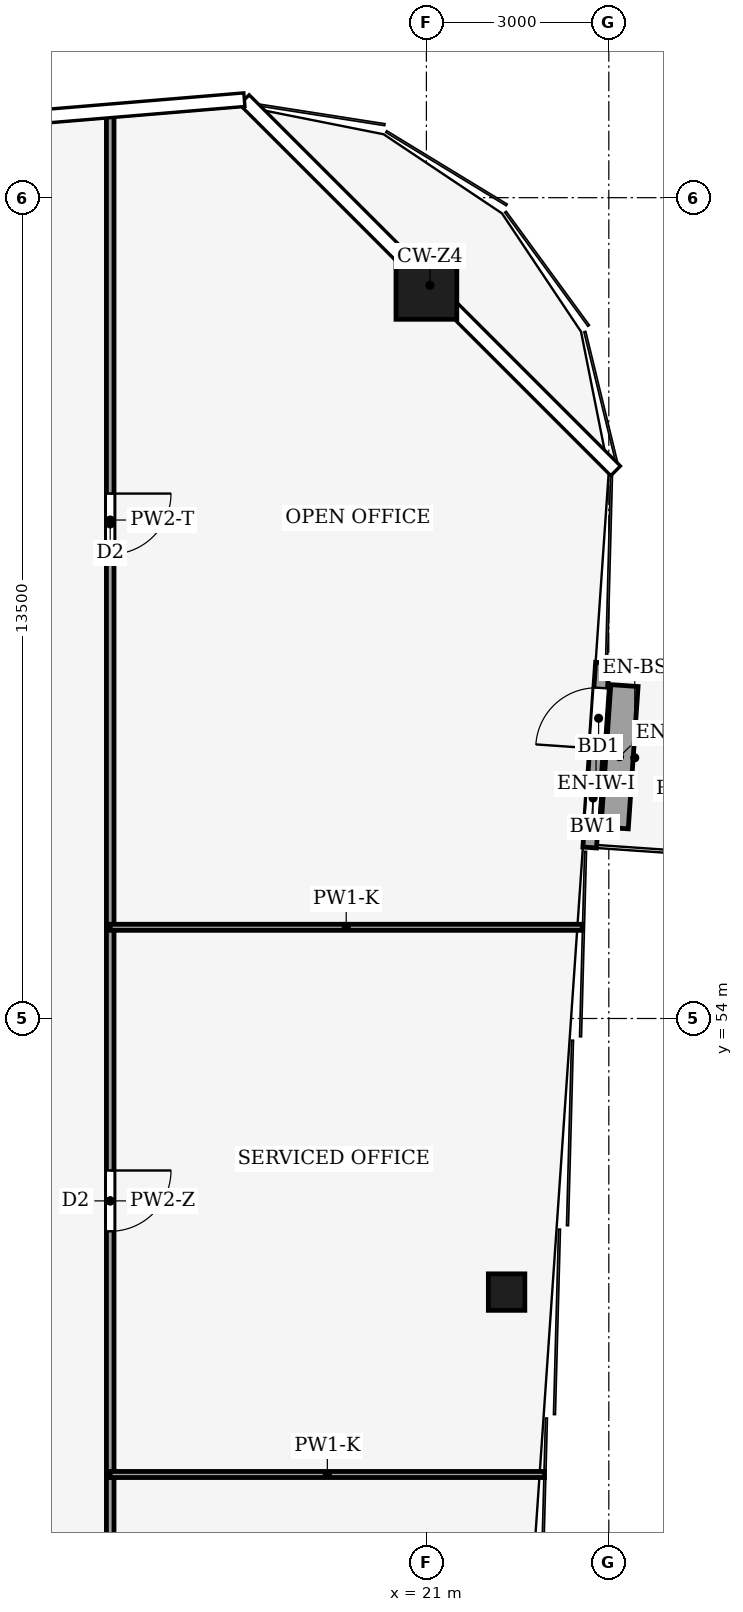
"""IFC4 building model, lengths in metres.
Left out: names, types, materials, properties, quantities, classifications, styles, units other than length and angle.
Written with IfcOpenShell. Run it as: python <this file> out.ifc"""

import sys

from ifc_helpers import new_model, si_unit, direction, frame, frame_2d, origin, origin_2d, place, context, subcontext, project, spatial, rectangle, hollow_rectangle, extrude, element, fill, save


model = new_model("IFC4")
c1 = context("Model", 3, precision=1e-05, world=origin(), true_north=direction((0.0, 1.0)))
c2 = subcontext(c1, "Body", "Model", "MODEL_VIEW")
j1 = project(units=[si_unit("LENGTHUNIT", "METRE"), si_unit("PLANEANGLEUNIT", "RADIAN")], contexts=[c1])
p1 = place(None, origin())
s1 = spatial("IfcSite", under=j1, at=p1, CompositionType="ELEMENT")
p2 = place(p1, origin())
s2 = spatial("IfcBuilding", under=s1, at=p2, CompositionType="ELEMENT")
p3 = place(p2, frame((0.0, 0.0, 278.0)))
s3 = spatial("IfcBuildingStorey", under=s2, at=p3, CompositionType="ELEMENT", Elevation=278.0)
p4 = place(p3, frame((21.0, 66.0, 0.0), z_axis=(0.0, 0.0, 1.0), x_axis=(1.0, 0.0, 0.0)))
e1 = element("IfcColumn", 1, at=p4, inside=s3, PredefinedType="COLUMN", context=c2, shape_type="SweptSolid", body=[
    extrude(hollow_rectangle(XDim=1.0, YDim=1.0, WallThickness=0.045, at=origin_2d()), origin(), (0.0, 0.0, 1.0), 4.0),
])
p5 = place(p3, frame((22.319, 49.5, 0.0), z_axis=(0.0, 0.0, 1.0), x_axis=(1.0, 0.0, 0.0)))
e2 = element("IfcColumn", 2, at=p5, inside=s3, PredefinedType="COLUMN", context=c2, shape_type="SweptSolid", body=[
    extrude(hollow_rectangle(XDim=0.6, YDim=0.6, WallThickness=0.025, at=origin_2d()), origin(), (0.0, 0.0, 1.0), 4.0),
])
p6 = place(p3, frame((23.686, 56.812, 0.0), z_axis=(0.0, 0.0, 1.0), x_axis=(0.06875808698, 0.99763336225, 0.0)))
e3 = element("IfcWall", 3, at=p6, inside=s3, PredefinedType="SOLIDWALL", context=c2, shape_type="SweptSolid", body=[
    extrude(rectangle(XDim=3.047, YDim=0.224, at=frame_2d((1.523, 0.0))), origin(), (0.0, 0.0, 1.0), 3.65),
])
p7 = place(p6, frame((1.631, 0.0, 0.0)))
e4 = element("IfcOpeningElement", 4, at=p7, cuts=e3, PredefinedType="OPENING", context=c2, shape_type="SweptSolid", body=[
    extrude(rectangle(XDim=1.0, YDim=2.1, at=frame_2d((0.5, 1.05))), frame((0.0, 0.122, 0.0), z_axis=(0.0, -1.0, 0.0), x_axis=(1.0, 0.0, 0.0)), (0.0, 0.0, 1.0), 0.244),
])
p8 = place(p6, frame((0.416, 0.0, 0.9)))
e5 = element("IfcOpeningElement", 5, at=p8, cuts=e3, PredefinedType="OPENING", context=c2, shape_type="SweptSolid", body=[
    extrude(rectangle(XDim=0.8, YDim=1.2, at=frame_2d((0.4, 0.6))), frame((0.0, 0.122, 0.0), z_axis=(0.0, -1.0, 0.0), x_axis=(1.0, 0.0, 0.0)), (0.0, 0.0, 1.0), 0.244),
])
p9 = place(p3, frame((24.096, 57.135, 0.0), z_axis=(0.0, 0.0, 1.0), x_axis=(0.06877709495, 0.997632052016, 0.0)))
e6 = element("IfcWall", 6, at=p9, inside=s3, PredefinedType="USERDEFINED", context=c2, shape_type="SweptSolid", body=[
    extrude(rectangle(XDim=2.346, YDim=0.45, at=frame_2d((1.173, 0.0))), origin(), (0.0, 0.0, 1.0), 0.4),
])
p10 = place(p3, frame((15.8, 46.5, 0.0), z_axis=(0.0, 0.0, 1.0), x_axis=(0.0, -1.0, 0.0)))
e7 = element("IfcWall", 7, at=p10, inside=s3, PredefinedType="PARTITIONING", context=c2, shape_type="SweptSolid", body=[
    extrude(rectangle(XDim=12.0, YDim=0.125, at=frame_2d((6.0, 0.0))), origin(), (0.0, 0.0, 1.0), 3.02),
])
p11 = place(p10, frame((5.5, 0.0, 0.0)))
e8 = element("IfcOpeningElement", 8, at=p11, cuts=e7, PredefinedType="OPENING", context=c2, shape_type="SweptSolid", body=[
    extrude(rectangle(XDim=1.0, YDim=2.1, at=frame_2d((0.5, 1.05))), frame((0.0, 0.073, 0.0), z_axis=(0.0, -1.0, 0.0), x_axis=(1.0, 0.0, 0.0)), (0.0, 0.0, 1.0), 0.145),
])
p12 = place(p3, frame((15.8, 55.5, 0.0), z_axis=(0.0, 0.0, 1.0), x_axis=(0.0, -1.0, 0.0)))
e9 = element("IfcWall", 9, at=p12, inside=s3, PredefinedType="PARTITIONING", context=c2, shape_type="SweptSolid", body=[
    extrude(rectangle(XDim=9.0, YDim=0.125, at=frame_2d((4.5, 0.0))), origin(), (0.0, 0.0, 1.0), 3.12),
])
p13 = place(p12, frame((4.0, 0.0, 0.0)))
e10 = element("IfcOpeningElement", 10, at=p13, cuts=e9, PredefinedType="OPENING", context=c2, shape_type="SweptSolid", body=[
    extrude(rectangle(XDim=1.0, YDim=2.1, at=frame_2d((0.5, 1.05))), frame((0.0, 0.073, 0.0), z_axis=(0.0, -1.0, 0.0), x_axis=(1.0, 0.0, 0.0)), (0.0, 0.0, 1.0), 0.145),
])
p14 = place(p3, frame((15.8, 68.897, 0.0), z_axis=(0.0, 0.0, 1.0), x_axis=(0.0, -1.0, 0.0)))
e11 = element("IfcWall", 11, at=p14, inside=s3, PredefinedType="PARTITIONING", context=c2, shape_type="SweptSolid", body=[
    extrude(rectangle(XDim=13.397, YDim=0.125, at=frame_2d((6.698, 0.0))), origin(), (0.0, 0.0, 1.0), 2.92),
])
p15 = place(p14, frame((6.263, 0.0, 0.0)))
e12 = element("IfcOpeningElement", 12, at=p15, cuts=e11, PredefinedType="OPENING", context=c2, shape_type="SweptSolid", body=[
    extrude(rectangle(XDim=1.0, YDim=2.1, at=frame_2d((0.5, 1.05))), frame((0.0, 0.073, 0.0), z_axis=(0.0, -1.0, 0.0), x_axis=(1.0, 0.0, 0.0)), (0.0, 0.0, 1.0), 0.145),
])
p16 = place(p3, frame((22.942, 46.5, 0.0), z_axis=(0.0, 0.0, 1.0), x_axis=(-1.0, 0.0, 0.0)))
e13 = element("IfcWall", 13, at=p16, inside=s3, PredefinedType="PARTITIONING", context=c2, shape_type="SweptSolid", body=[
    extrude(rectangle(XDim=7.142, YDim=0.1, at=frame_2d((3.571, 0.0))), origin(), (0.0, 0.0, 1.0), 2.92),
])
p17 = place(p3, frame((23.563, 55.5, 0.0), z_axis=(0.0, 0.0, 1.0), x_axis=(-1.0, 0.0, 0.0)))
e14 = element("IfcWall", 14, at=p17, inside=s3, PredefinedType="PARTITIONING", context=c2, shape_type="SweptSolid", body=[
    extrude(rectangle(XDim=7.763, YDim=0.1, at=frame_2d((3.881, 0.0))), origin(), (0.0, 0.0, 1.0), 2.92),
])
p18 = place(p7, origin())
e15 = element("IfcDoor", 15, at=p18, inside=s3, OperationType="SINGLE_SWING_RIGHT", PredefinedType="DOOR", context=c2, shape_type="SweptSolid", body=[
    extrude(rectangle(XDim=1.0, YDim=2.1, at=frame_2d((0.5, 1.05))), frame((0.0, 0.025, 0.0), z_axis=(0.0, -1.0, 0.0), x_axis=(1.0, 0.0, 0.0)), (0.0, 0.0, 1.0), 0.05),
])
fill(e4, e15)
p19 = place(p8, origin())
e16 = element("IfcWindow", 16, at=p19, inside=s3, PartitioningType="SINGLE_PANEL", PredefinedType="WINDOW", context=c2, shape_type="SweptSolid", body=[
    extrude(rectangle(XDim=0.8, YDim=1.2, at=frame_2d((0.4, 0.6))), frame((0.0, 0.03, 0.0), z_axis=(0.0, -1.0, 0.0), x_axis=(1.0, 0.0, 0.0)), (0.0, 0.0, 1.0), 0.06),
])
fill(e5, e16)
p20 = place(p13, origin())
e17 = element("IfcDoor", 17, at=p20, inside=s3, OperationType="SINGLE_SWING_LEFT", PredefinedType="DOOR", context=c2, shape_type="SweptSolid", body=[
    extrude(rectangle(XDim=1.0, YDim=2.1, at=frame_2d((0.5, 1.05))), frame((0.0, 0.025, 0.0), z_axis=(0.0, -1.0, 0.0), x_axis=(1.0, 0.0, 0.0)), (0.0, 0.0, 1.0), 0.05),
])
fill(e10, e17)
p21 = place(p15, origin())
e18 = element("IfcDoor", 18, at=p21, inside=s3, OperationType="SINGLE_SWING_RIGHT", PredefinedType="DOOR", context=c2, shape_type="SweptSolid", body=[
    extrude(rectangle(XDim=1.0, YDim=2.1, at=frame_2d((0.5, 1.05))), frame((0.0, 0.025, 0.0), z_axis=(0.0, -1.0, 0.0), x_axis=(1.0, 0.0, 0.0)), (0.0, 0.0, 1.0), 0.05),
])
fill(e12, e18)
save(model, sys.argv[1])
